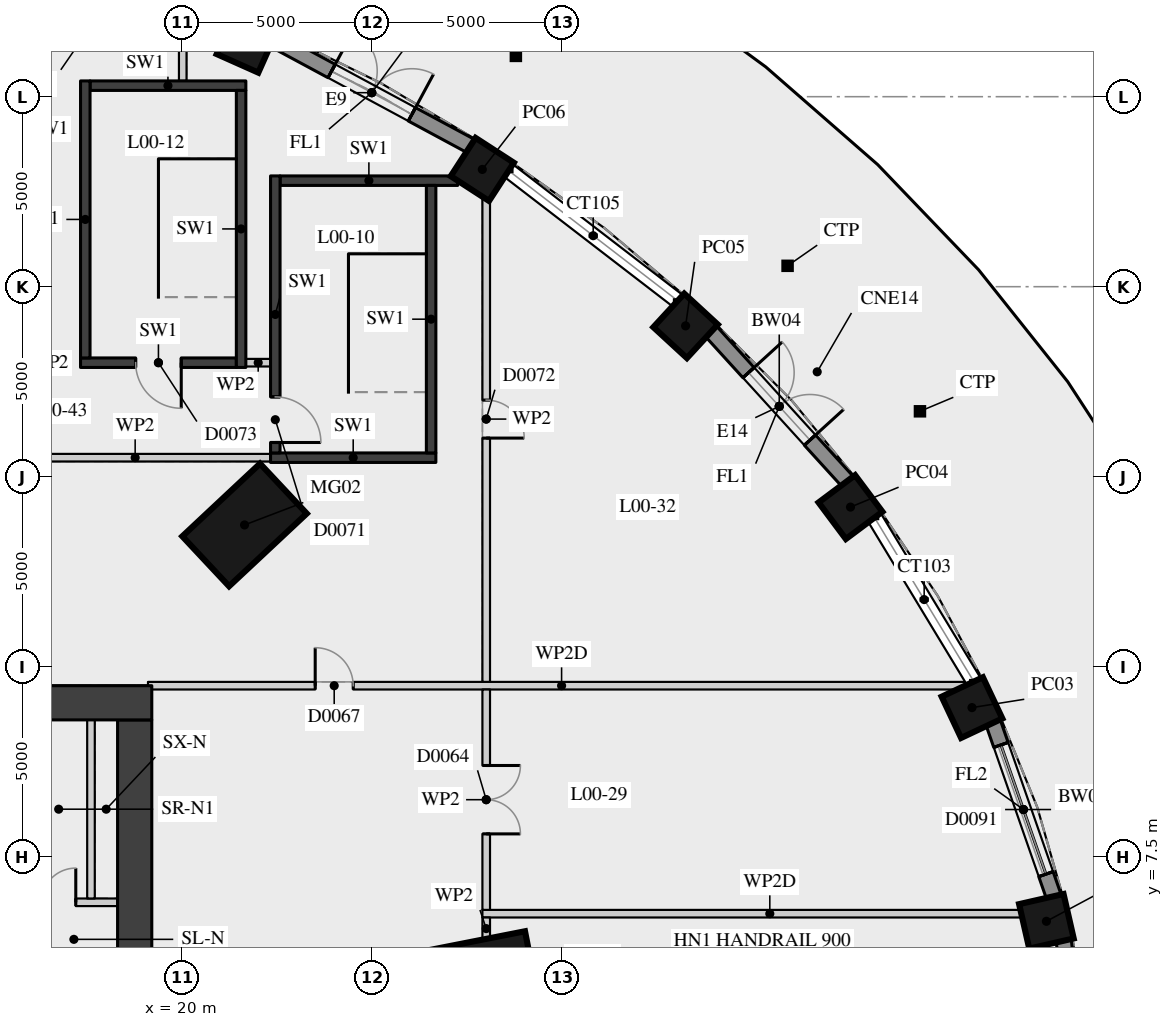
"""IFC4 building model, lengths in metres.
Left out: names, types, materials, properties, quantities, classifications, styles, units other than length and angle.
Written with IfcOpenShell. Run it as: python <this file> out.ifc"""

import sys

from ifc_helpers import new_model, si_unit, direction, frame, frame_2d, origin, origin_2d, place, context, subcontext, project, spatial, rectangle, hollow_circle, extrude, element, fill, save


model = new_model("IFC4")
c1 = context("Model", 3, precision=1e-05, world=origin(), true_north=direction((0.0, 1.0)))
c2 = subcontext(c1, "Body", "Model", "MODEL_VIEW")
j1 = project(units=[si_unit("LENGTHUNIT", "METRE"), si_unit("PLANEANGLEUNIT", "RADIAN")], contexts=[c1])
p1 = place(None, origin())
s1 = spatial("IfcSite", under=j1, at=p1, CompositionType="ELEMENT")
p2 = place(p1, origin())
s2 = spatial("IfcBuilding", under=s1, at=p2, CompositionType="ELEMENT")
p3 = place(p2, origin())
s3 = spatial("IfcBuildingStorey", under=s2, at=p3, CompositionType="ELEMENT", Elevation=0.0)
for number, where, z_axis, x_axis in (
    (1, (27.821, 4.385, 0.0), (0.0, 0.0, 1.0), (0.981, 0.193, 0.0)),
    (2, (21.641, 16.23, 0.0), (0.0, 0.0, 1.0), (0.73, 0.683, 0.0)),
):
    element("IfcColumn", number, at=place(p3, frame(where, z_axis=z_axis, x_axis=x_axis)), inside=s3, PredefinedType="COLUMN", context=c2, shape_type="SweptSolid", body=[
        extrude(rectangle(XDim=2.8, YDim=1.8, at=origin_2d()), origin(), (0.0, 0.0, 1.0), 7.5),
    ])
for number, where, z_axis, x_axis in (
    (3, (42.741, 5.8, 0.0), (0.0, 0.0, 1.0), (0.975, 0.222, 0.0)),
    (4, (40.783, 11.424, 0.0), (0.0, 0.0, 1.0), (0.905, 0.426, 0.0)),
    (5, (37.585, 16.7, 0.0), (0.0, 0.0, 1.0), (0.801, 0.599, 0.0)),
    (6, (33.246, 21.469, 0.0), (0.0, 0.0, 1.0), (0.677, 0.736, 0.0)),
    (7, (27.897, 25.586, 0.0), (0.0, 0.0, 1.0), (0.544, 0.839, 0.0)),
    (8, (21.7, 28.925, 0.0), (0.0, 0.0, 1.0), (0.407, 0.913, 0.0)),
):
    element("IfcColumn", number, at=place(p3, frame(where, z_axis=z_axis, x_axis=x_axis)), inside=s3, PredefinedType="COLUMN", context=c2, shape_type="SweptSolid", body=[
        extrude(rectangle(XDim=1.2, YDim=1.2, at=origin_2d()), origin(), (0.0, 0.0, 1.0), 7.5),
    ])
p4 = place(p3, frame((43.734, 0.57, 0.0), z_axis=(0.0, 0.0, 1.0), x_axis=(-0.112954392721, 0.993600173694, 0.0)))
e9 = element("IfcWall", 9, at=p4, inside=s3, PredefinedType="SOLIDWALL", context=c2, shape_type="SweptSolid", body=[
    extrude(rectangle(XDim=4.779, YDim=0.4, at=frame_2d((2.389, 0.0))), origin(), (0.0, 0.0, 1.0), 6.19),
])
p5 = place(p4, frame((1.189, 0.0, 0.0)))
e10 = element("IfcOpeningElement", 10, at=p5, cuts=e9, PredefinedType="OPENING", context=c2, shape_type="SweptSolid", body=[
    extrude(rectangle(XDim=2.4, YDim=2.2, at=frame_2d((1.2, 1.1))), frame((0.0, 0.21, 0.0), z_axis=(0.0, -1.0, 0.0), x_axis=(1.0, 0.0, 0.0)), (0.0, 0.0, 1.0), 0.42),
])
p6 = place(p4, frame((1.189, 0.0, 2.6)))
e11 = element("IfcOpeningElement", 11, at=p6, cuts=e9, PredefinedType="OPENING", context=c2, shape_type="SweptSolid", body=[
    extrude(rectangle(XDim=2.4, YDim=3.49, at=frame_2d((1.2, 1.745))), frame((0.0, 0.21, 0.0), z_axis=(0.0, -1.0, 0.0), x_axis=(1.0, 0.0, 0.0)), (0.0, 0.0, 1.0), 0.42),
])
p7 = place(p3, frame((42.941, 6.43, 0.0), z_axis=(0.0, 0.0, 1.0), x_axis=(-0.328772164332, 0.944409267193, 0.0)))
e12 = element("IfcWall", 12, at=p7, inside=s3, PredefinedType="SOLIDWALL", context=c2, shape_type="SweptSolid", body=[
    extrude(rectangle(XDim=4.894, YDim=0.4, at=frame_2d((2.447, 0.0))), origin(), (0.0, 0.0, 1.0), 6.19),
])
p8 = place(p7, frame((0.647, 0.0, 0.0)))
e13 = element("IfcOpeningElement", 13, at=p8, cuts=e12, PredefinedType="OPENING", context=c2, shape_type="SweptSolid", body=[
    extrude(rectangle(XDim=3.6, YDim=4.5, at=frame_2d((1.8, 2.25))), frame((0.0, 0.21, 0.0), z_axis=(0.0, -1.0, 0.0), x_axis=(1.0, 0.0, 0.0)), (0.0, 0.0, 1.0), 0.42),
])
p9 = place(p7, frame((0.647, 0.0, 4.9)))
e14 = element("IfcOpeningElement", 14, at=p9, cuts=e12, PredefinedType="OPENING", context=c2, shape_type="SweptSolid", body=[
    extrude(rectangle(XDim=3.6, YDim=1.19, at=frame_2d((1.8, 0.595))), frame((0.0, 0.21, 0.0), z_axis=(0.0, -1.0, 0.0), x_axis=(1.0, 0.0, 0.0)), (0.0, 0.0, 1.0), 0.42),
])
p10 = place(p3, frame((37.52, 17.363, 0.0), z_axis=(0.0, 0.0, 1.0), x_axis=(-0.672941720846, 0.739695505153, 0.0)))
e15 = element("IfcWall", 15, at=p10, inside=s3, PredefinedType="SOLIDWALL", context=c2, shape_type="SweptSolid", body=[
    extrude(rectangle(XDim=5.376, YDim=0.4, at=frame_2d((2.688, 0.0))), origin(), (0.0, 0.0, 1.0), 6.19),
])
p11 = place(p10, frame((1.488, 0.0, 0.0)))
e16 = element("IfcOpeningElement", 16, at=p11, cuts=e15, PredefinedType="OPENING", context=c2, shape_type="SweptSolid", body=[
    extrude(rectangle(XDim=2.4, YDim=2.2, at=frame_2d((1.2, 1.1))), frame((0.0, 0.21, 0.0), z_axis=(0.0, -1.0, 0.0), x_axis=(1.0, 0.0, 0.0)), (0.0, 0.0, 1.0), 0.42),
])
p12 = place(p10, frame((1.488, 0.0, 2.6)))
e17 = element("IfcOpeningElement", 17, at=p12, cuts=e15, PredefinedType="OPENING", context=c2, shape_type="SweptSolid", body=[
    extrude(rectangle(XDim=2.4, YDim=3.49, at=frame_2d((1.2, 1.745))), frame((0.0, 0.21, 0.0), z_axis=(0.0, -1.0, 0.0), x_axis=(1.0, 0.0, 0.0)), (0.0, 0.0, 1.0), 0.42),
])
for number, where, z_axis, x_axis in (
    (18, (39.413, 19.22, -0.2), (0.0, 0.0, 1.0), (1.0, 0.0, 0.0)),
    (19, (35.93, 23.049, -0.2), (0.0, 0.0, 1.0), (1.0, 0.0, 0.0)),
):
    element("IfcColumn", number, at=place(p3, frame(where, z_axis=z_axis, x_axis=x_axis)), inside=s3, PredefinedType="COLUMN", context=c2, shape_type="SweptSolid", body=[
        extrude(hollow_circle(Radius=0.084, WallThickness=0.008, at=origin_2d()), origin(), (0.0, 0.0, 1.0), 4.755),
    ])
p13 = place(p3, frame((27.611, 26.192, 0.0), z_axis=(0.0, 0.0, 1.0), x_axis=(-0.880313157301, 0.474393028072, 0.0)))
e20 = element("IfcWall", 20, at=p13, inside=s3, PredefinedType="SOLIDWALL", context=c2, shape_type="SweptSolid", body=[
    extrude(rectangle(XDim=5.958, YDim=0.4, at=frame_2d((2.979, 0.0))), origin(), (0.0, 0.0, 1.0), 6.19),
])
p14 = place(p13, frame((1.779, 0.0, 0.0)))
e21 = element("IfcOpeningElement", 21, at=p14, cuts=e20, PredefinedType="OPENING", context=c2, shape_type="SweptSolid", body=[
    extrude(rectangle(XDim=2.4, YDim=2.2, at=frame_2d((1.2, 1.1))), frame((0.0, 0.21, 0.0), z_axis=(0.0, -1.0, 0.0), x_axis=(1.0, 0.0, 0.0)), (0.0, 0.0, 1.0), 0.42),
])
p15 = place(p13, frame((1.779, 0.0, 2.6)))
e22 = element("IfcOpeningElement", 22, at=p15, cuts=e20, PredefinedType="OPENING", context=c2, shape_type="SweptSolid", body=[
    extrude(rectangle(XDim=2.4, YDim=3.49, at=frame_2d((1.2, 1.745))), frame((0.0, 0.21, 0.0), z_axis=(0.0, -1.0, 0.0), x_axis=(1.0, 0.0, 0.0)), (0.0, 0.0, 1.0), 0.42),
])
p16 = place(p3, frame((28.781, 28.573, -0.2), z_axis=(0.0, 0.0, 1.0), x_axis=(1.0, 0.0, 0.0)))
e23 = element("IfcColumn", 23, at=p16, inside=s3, PredefinedType="COLUMN", context=c2, shape_type="SweptSolid", body=[
    extrude(hollow_circle(Radius=0.084, WallThickness=0.008, at=origin_2d()), origin(), (0.0, 0.0, 1.0), 4.755),
])
p17 = place(p3, frame((18.75, -11.1, 0.0), z_axis=(0.0, 0.0, 1.0), x_axis=(0.0, 1.0, 0.0)))
e24 = element("IfcWall", 24, at=p17, inside=s3, PredefinedType="SHEAR", context=c2, shape_type="SweptSolid", body=[
    extrude(rectangle(XDim=22.2, YDim=0.9, at=frame_2d((11.1, 0.0))), origin(), (0.0, 0.0, 1.0), 7.09),
])
p18 = place(p17, frame((7.55, 0.0, 0.0)))
e25 = element("IfcOpeningElement", 25, at=p18, cuts=e24, PredefinedType="OPENING", context=c2, shape_type="SweptSolid", body=[
    extrude(rectangle(XDim=1.3, YDim=2.1, at=frame_2d((0.65, 1.05))), frame((0.0, 0.46, 0.0), z_axis=(0.0, -1.0, 0.0), x_axis=(1.0, 0.0, 0.0)), (0.0, 0.0, 1.0), 0.92),
])
p19 = place(p17, frame((10.45, 0.0, 0.0)))
e26 = element("IfcOpeningElement", 26, at=p19, cuts=e24, PredefinedType="OPENING", context=c2, shape_type="SweptSolid", body=[
    extrude(rectangle(XDim=1.3, YDim=2.1, at=frame_2d((0.65, 1.05))), frame((0.0, 0.46, 0.0), z_axis=(0.0, -1.0, 0.0), x_axis=(1.0, 0.0, 0.0)), (0.0, 0.0, 1.0), 0.92),
])
p20 = place(p17, frame((13.35, 0.0, 0.0)))
e27 = element("IfcOpeningElement", 27, at=p20, cuts=e24, PredefinedType="OPENING", context=c2, shape_type="SweptSolid", body=[
    extrude(rectangle(XDim=1.3, YDim=2.1, at=frame_2d((0.65, 1.05))), frame((0.0, 0.46, 0.0), z_axis=(0.0, -1.0, 0.0), x_axis=(1.0, 0.0, 0.0)), (0.0, 0.0, 1.0), 0.92),
])
p21 = place(p3, frame((4.0, 11.55, 0.0), z_axis=(0.0, 0.0, 1.0), x_axis=(1.0, 0.0, 0.0)))
e28 = element("IfcWall", 28, at=p21, inside=s3, PredefinedType="SHEAR", context=c2, shape_type="SweptSolid", body=[
    extrude(rectangle(XDim=15.2, YDim=0.9, at=frame_2d((7.6, 0.0))), origin(), (0.0, 0.0, 1.0), 7.09),
])
p22 = place(p3, frame((16.0, 6.3, 0.0), z_axis=(0.0, 0.0, 1.0), x_axis=(1.0, 0.0, 0.0)))
e29 = element("IfcWall", 29, at=p22, inside=s3, PredefinedType="PARTITIONING", context=c2, shape_type="SweptSolid", body=[
    extrude(rectangle(XDim=2.3, YDim=0.2, at=frame_2d((1.15, 0.0))), origin(), (0.0, 0.0, 1.0), 7.09),
])
p23 = place(p22, frame((0.3, 0.0, 0.0)))
e30 = element("IfcOpeningElement", 30, at=p23, cuts=e29, PredefinedType="OPENING", context=c2, shape_type="SweptSolid", body=[
    extrude(rectangle(XDim=0.9, YDim=2.1, at=frame_2d((0.45, 1.05))), frame((0.0, 0.11, 0.0), z_axis=(0.0, -1.0, 0.0), x_axis=(1.0, 0.0, 0.0)), (0.0, 0.0, 1.0), 0.22),
])
p24 = place(p3, frame((17.6, 6.4, 0.0), z_axis=(0.0, 0.0, 1.0), x_axis=(0.0, 1.0, 0.0)))
e31 = element("IfcWall", 31, at=p24, inside=s3, PredefinedType="PARTITIONING", context=c2, shape_type="SweptSolid", body=[
    extrude(rectangle(XDim=4.7, YDim=0.2, at=frame_2d((2.35, 0.0))), origin(), (0.0, 0.0, 1.0), 7.09),
])
p25 = place(p3, frame((27.9, 6.0, 0.0), z_axis=(0.0, 0.0, 1.0), x_axis=(1.0, 0.0, 0.0)))
e32 = element("IfcWall", 32, at=p25, inside=s3, PredefinedType="PARTITIONING", context=c2, shape_type="SweptSolid", body=[
    extrude(rectangle(XDim=15.125, YDim=0.2, at=frame_2d((7.562, 0.0))), origin(), (0.0, 0.0, 1.0), 6.09),
])
p26 = place(p3, frame((19.1, 12.0, 0.0), z_axis=(0.0, 0.0, 1.0), x_axis=(1.0, 0.0, 0.0)))
e33 = element("IfcWall", 33, at=p26, inside=s3, PredefinedType="PARTITIONING", context=c2, shape_type="SweptSolid", body=[
    extrude(rectangle(XDim=21.767, YDim=0.2, at=frame_2d((10.883, 0.0))), origin(), (0.0, 0.0, 1.0), 6.09),
])
p27 = place(p26, frame((4.4, 0.0, 0.0)))
e34 = element("IfcOpeningElement", 34, at=p27, cuts=e33, PredefinedType="OPENING", context=c2, shape_type="SweptSolid", body=[
    extrude(rectangle(XDim=1.0, YDim=2.1, at=frame_2d((0.5, 1.05))), frame((0.0, 0.11, 0.0), z_axis=(0.0, -1.0, 0.0), x_axis=(1.0, 0.0, 0.0)), (0.0, 0.0, 1.0), 0.22),
])
p28 = place(p3, frame((15.2, 18.0, 0.0), z_axis=(0.0, 0.0, 1.0), x_axis=(1.0, 0.0, 0.0)))
e35 = element("IfcWall", 35, at=p28, inside=s3, PredefinedType="PARTITIONING", context=c2, shape_type="SweptSolid", body=[
    extrude(rectangle(XDim=7.125, YDim=0.2, at=frame_2d((3.562, 0.0))), origin(), (0.0, 0.0, 1.0), 7.09),
])
p29 = place(p3, frame((22.325, 18.0, 0.0), z_axis=(0.0, 0.0, 1.0), x_axis=(1.0, 0.0, 0.0)))
e36 = element("IfcWall", 36, at=p29, inside=s3, PredefinedType="SOLIDWALL", context=c2, shape_type="SweptSolid", body=[
    extrude(rectangle(XDim=4.35, YDim=0.25, at=frame_2d((2.175, 0.0))), origin(), (0.0, 0.0, 1.0), 7.09),
])
p30 = place(p3, frame((17.325, 20.5, 0.0), z_axis=(0.0, 0.0, 1.0), x_axis=(1.0, 0.0, 0.0)))
e37 = element("IfcWall", 37, at=p30, inside=s3, PredefinedType="SOLIDWALL", context=c2, shape_type="SweptSolid", body=[
    extrude(rectangle(XDim=4.1, YDim=0.25, at=frame_2d((2.05, 0.0))), origin(), (0.0, 0.0, 1.0), 7.09),
])
p31 = place(p30, frame((1.45, 0.0, 0.0)))
e38 = element("IfcOpeningElement", 38, at=p31, cuts=e37, PredefinedType="OPENING", context=c2, shape_type="SweptSolid", body=[
    extrude(rectangle(XDim=1.2, YDim=2.1, at=frame_2d((0.6, 1.05))), frame((0.0, 0.135, 0.0), z_axis=(0.0, -1.0, 0.0), x_axis=(1.0, 0.0, 0.0)), (0.0, 0.0, 1.0), 0.27),
])
p32 = place(p3, frame((21.675, 20.5, 0.0), z_axis=(0.0, 0.0, 1.0), x_axis=(1.0, 0.0, 0.0)))
e39 = element("IfcWall", 39, at=p32, inside=s3, PredefinedType="PARTITIONING", context=c2, shape_type="SweptSolid", body=[
    extrude(rectangle(XDim=0.65, YDim=0.2, at=frame_2d((0.325, 0.0))), origin(), (0.0, 0.0, 1.0), 7.09),
])
p33 = place(p3, frame((22.575, 25.29, 0.0), z_axis=(0.0, 0.0, 1.0), x_axis=(1.0, 0.0, 0.0)))
e40 = element("IfcWall", 40, at=p33, inside=s3, PredefinedType="SOLIDWALL", context=c2, shape_type="SweptSolid", body=[
    extrude(rectangle(XDim=4.676, YDim=0.25, at=frame_2d((2.338, 0.0))), origin(), (0.0, 0.0, 1.0), 7.09),
])
p34 = place(p3, frame((17.575, 27.79, 0.0), z_axis=(0.0, 0.0, 1.0), x_axis=(1.0, 0.0, 0.0)))
e41 = element("IfcWall", 41, at=p34, inside=s3, PredefinedType="SOLIDWALL", context=c2, shape_type="SweptSolid", body=[
    extrude(rectangle(XDim=4.1, YDim=0.25, at=frame_2d((2.05, 0.0))), origin(), (0.0, 0.0, 1.0), 7.09),
])
p35 = place(p3, frame((17.45, 20.625, 0.0), z_axis=(0.0, 0.0, 1.0), x_axis=(0.0, 1.0, 0.0)))
e42 = element("IfcWall", 42, at=p35, inside=s3, PredefinedType="SOLIDWALL", context=c2, shape_type="SweptSolid", body=[
    extrude(rectangle(XDim=7.29, YDim=0.25, at=frame_2d((3.645, 0.0))), origin(), (0.0, 0.0, 1.0), 7.09),
])
p36 = place(p3, frame((20.014, 27.915, 0.0), z_axis=(0.0, 0.0, 1.0), x_axis=(0.0, 1.0, 0.0)))
e43 = element("IfcWall", 43, at=p36, inside=s3, PredefinedType="PARTITIONING", context=c2, shape_type="SweptSolid", body=[
    extrude(rectangle(XDim=2.05, YDim=0.2, at=frame_2d((1.025, 0.0))), origin(), (0.0, 0.0, 1.0), 7.09),
])
p37 = place(p3, frame((21.55, 20.375, 0.0), z_axis=(0.0, 0.0, 1.0), x_axis=(0.0, 1.0, 0.0)))
e44 = element("IfcWall", 44, at=p37, inside=s3, PredefinedType="SOLIDWALL", context=c2, shape_type="SweptSolid", body=[
    extrude(rectangle(XDim=7.29, YDim=0.25, at=frame_2d((3.645, 0.0))), origin(), (0.0, 0.0, 1.0), 7.09),
])
p38 = place(p3, frame((22.45, 18.125, 0.0), z_axis=(0.0, 0.0, 1.0), x_axis=(0.0, 1.0, 0.0)))
e45 = element("IfcWall", 45, at=p38, inside=s3, PredefinedType="SOLIDWALL", context=c2, shape_type="SweptSolid", body=[
    extrude(rectangle(XDim=7.29, YDim=0.25, at=frame_2d((3.645, 0.0))), origin(), (0.0, 0.0, 1.0), 7.09),
])
p39 = place(p38, frame((0.275, 0.0, 0.0)))
e46 = element("IfcOpeningElement", 46, at=p39, cuts=e45, PredefinedType="OPENING", context=c2, shape_type="SweptSolid", body=[
    extrude(rectangle(XDim=1.2, YDim=2.1, at=frame_2d((0.6, 1.05))), frame((0.0, 0.135, 0.0), z_axis=(0.0, -1.0, 0.0), x_axis=(1.0, 0.0, 0.0)), (0.0, 0.0, 1.0), 0.27),
])
p40 = place(p3, frame((26.55, 18.125, 0.0), z_axis=(0.0, 0.0, 1.0), x_axis=(0.0, 1.0, 0.0)))
e47 = element("IfcWall", 47, at=p40, inside=s3, PredefinedType="SOLIDWALL", context=c2, shape_type="SweptSolid", body=[
    extrude(rectangle(XDim=7.04, YDim=0.25, at=frame_2d((3.52, 0.0))), origin(), (0.0, 0.0, 1.0), 7.09),
])
p41 = place(p3, frame((28.0, 5.315, 0.0), z_axis=(0.0, 0.0, 1.0), x_axis=(0.0, 1.0, 0.0)))
e48 = element("IfcWall", 48, at=p41, inside=s3, PredefinedType="PARTITIONING", context=c2, shape_type="SweptSolid", body=[
    extrude(rectangle(XDim=0.584, YDim=0.2, at=frame_2d((0.292, 0.0))), origin(), (0.0, 0.0, 1.0), 7.09),
])
p42 = place(p3, frame((28.0, 6.1, 0.0), z_axis=(0.0, 0.0, 1.0), x_axis=(0.0, 1.0, 0.0)))
e49 = element("IfcWall", 49, at=p42, inside=s3, PredefinedType="PARTITIONING", context=c2, shape_type="SweptSolid", body=[
    extrude(rectangle(XDim=5.8, YDim=0.2, at=frame_2d((2.9, 0.0))), origin(), (0.0, 0.0, 1.0), 7.09),
])
p43 = place(p42, frame((2.0, 0.0, 0.0)))
e50 = element("IfcOpeningElement", 50, at=p43, cuts=e49, PredefinedType="OPENING", context=c2, shape_type="SweptSolid", body=[
    extrude(rectangle(XDim=1.8, YDim=2.1, at=frame_2d((0.9, 1.05))), frame((0.0, 0.11, 0.0), z_axis=(0.0, -1.0, 0.0), x_axis=(1.0, 0.0, 0.0)), (0.0, 0.0, 1.0), 0.22),
])
p44 = place(p3, frame((28.0, 12.1, 0.0), z_axis=(0.0, 0.0, 1.0), x_axis=(0.0, 1.0, 0.0)))
e51 = element("IfcWall", 51, at=p44, inside=s3, PredefinedType="PARTITIONING", context=c2, shape_type="SweptSolid", body=[
    extrude(rectangle(XDim=13.832, YDim=0.2, at=frame_2d((6.916, 0.0))), origin(), (0.0, 0.0, 1.0), 7.09),
])
p45 = place(p44, frame((6.416, 0.0, 0.0)))
e52 = element("IfcOpeningElement", 52, at=p45, cuts=e51, PredefinedType="OPENING", context=c2, shape_type="SweptSolid", body=[
    extrude(rectangle(XDim=1.0, YDim=2.1, at=frame_2d((0.5, 1.05))), frame((0.0, 0.11, 0.0), z_axis=(0.0, -1.0, 0.0), x_axis=(1.0, 0.0, 0.0)), (0.0, 0.0, 1.0), 0.22),
])
p46 = place(p8, frame((3.6, 0.0, 0.0), z_axis=(0.0, 0.0, 1.0), x_axis=(-1.0, 0.0, 0.0)))
e53 = element("IfcDoor", 53, at=p46, inside=s3, OperationType="ROLLINGUP", PredefinedType="DOOR", context=c2, shape_type="SweptSolid", body=[
    extrude(rectangle(XDim=3.6, YDim=4.5, at=frame_2d((1.8, 2.25))), frame((0.0, 0.05, 0.0), z_axis=(0.0, -1.0, 0.0), x_axis=(1.0, 0.0, 0.0)), (0.0, 0.0, 1.0), 0.05),
])
fill(e13, e53)
p47 = place(p9, origin())
e54 = element("IfcWindow", 54, at=p47, inside=s3, PartitioningType="SINGLE_PANEL", PredefinedType="WINDOW", context=c2, shape_type="SweptSolid", body=[
    extrude(rectangle(XDim=3.6, YDim=1.19, at=frame_2d((1.8, 0.595))), frame((0.0, 0.01, 0.0), z_axis=(0.0, -1.0, 0.0), x_axis=(1.0, 0.0, 0.0)), (0.0, 0.0, 1.0), 0.06),
])
fill(e14, e54)
p48 = place(p11, frame((2.4, 0.0, 0.0), z_axis=(0.0, 0.0, 1.0), x_axis=(-1.0, 0.0, 0.0)))
e55 = element("IfcDoor", 55, at=p48, inside=s3, OperationType="DOUBLE_DOOR_SINGLE_SWING", PredefinedType="DOOR", context=c2, shape_type="SweptSolid", body=[
    extrude(rectangle(XDim=2.4, YDim=2.2, at=frame_2d((1.2, 1.1))), frame((0.0, 0.05, 0.0), z_axis=(0.0, -1.0, 0.0), x_axis=(1.0, 0.0, 0.0)), (0.0, 0.0, 1.0), 0.05),
])
fill(e16, e55)
p49 = place(p12, origin())
e56 = element("IfcWindow", 56, at=p49, inside=s3, PartitioningType="SINGLE_PANEL", PredefinedType="WINDOW", context=c2, shape_type="SweptSolid", body=[
    extrude(rectangle(XDim=2.4, YDim=3.49, at=frame_2d((1.2, 1.745))), frame((0.0, 0.01, 0.0), z_axis=(0.0, -1.0, 0.0), x_axis=(1.0, 0.0, 0.0)), (0.0, 0.0, 1.0), 0.06),
])
fill(e17, e56)
p50 = place(p14, frame((2.4, 0.0, 0.0), z_axis=(0.0, 0.0, 1.0), x_axis=(-1.0, 0.0, 0.0)))
e57 = element("IfcDoor", 57, at=p50, inside=s3, OperationType="DOUBLE_DOOR_SINGLE_SWING", PredefinedType="DOOR", context=c2, shape_type="SweptSolid", body=[
    extrude(rectangle(XDim=2.4, YDim=2.2, at=frame_2d((1.2, 1.1))), frame((0.0, 0.05, 0.0), z_axis=(0.0, -1.0, 0.0), x_axis=(1.0, 0.0, 0.0)), (0.0, 0.0, 1.0), 0.05),
])
fill(e21, e57)
p51 = place(p15, origin())
e58 = element("IfcWindow", 58, at=p51, inside=s3, PartitioningType="SINGLE_PANEL", PredefinedType="WINDOW", context=c2, shape_type="SweptSolid", body=[
    extrude(rectangle(XDim=2.4, YDim=3.49, at=frame_2d((1.2, 1.745))), frame((0.0, 0.01, 0.0), z_axis=(0.0, -1.0, 0.0), x_axis=(1.0, 0.0, 0.0)), (0.0, 0.0, 1.0), 0.06),
])
fill(e22, e58)
p52 = place(p23, origin())
e59 = element("IfcDoor", 59, at=p52, inside=s3, OperationType="SINGLE_SWING_RIGHT", PredefinedType="DOOR", context=c2, shape_type="SweptSolid", body=[
    extrude(rectangle(XDim=0.9, YDim=2.1, at=frame_2d((0.45, 1.05))), frame((0.0, 0.025, 0.0), z_axis=(0.0, -1.0, 0.0), x_axis=(1.0, 0.0, 0.0)), (0.0, 0.0, 1.0), 0.05),
])
fill(e30, e59)
p53 = place(p31, origin())
e60 = element("IfcDoor", 60, at=p53, inside=s3, OperationType="SINGLE_SWING_LEFT", PredefinedType="DOOR", context=c2, shape_type="SweptSolid", body=[
    extrude(rectangle(XDim=1.2, YDim=2.1, at=frame_2d((0.6, 1.05))), frame((0.0, 0.025, 0.0), z_axis=(0.0, -1.0, 0.0), x_axis=(1.0, 0.0, 0.0)), (0.0, 0.0, 1.0), 0.05),
])
fill(e38, e60)
p54 = place(p39, origin())
e61 = element("IfcDoor", 61, at=p54, inside=s3, OperationType="SINGLE_SWING_RIGHT", PredefinedType="DOOR", context=c2, shape_type="SweptSolid", body=[
    extrude(rectangle(XDim=1.2, YDim=2.1, at=frame_2d((0.6, 1.05))), frame((0.0, 0.025, 0.0), z_axis=(0.0, -1.0, 0.0), x_axis=(1.0, 0.0, 0.0)), (0.0, 0.0, 1.0), 0.05),
])
fill(e46, e61)
p55 = place(p27, origin())
e62 = element("IfcDoor", 62, at=p55, inside=s3, OperationType="SINGLE_SWING_LEFT", PredefinedType="DOOR", context=c2, shape_type="SweptSolid", body=[
    extrude(rectangle(XDim=1.0, YDim=2.1, at=frame_2d((0.5, 1.05))), frame((0.0, 0.025, 0.0), z_axis=(0.0, -1.0, 0.0), x_axis=(1.0, 0.0, 0.0)), (0.0, 0.0, 1.0), 0.05),
])
fill(e34, e62)
p56 = place(p43, origin())
e63 = element("IfcDoor", 63, at=p56, inside=s3, OperationType="DOUBLE_DOOR_SINGLE_SWING", PredefinedType="DOOR", context=c2, shape_type="SweptSolid", body=[
    extrude(rectangle(XDim=1.8, YDim=2.1, at=frame_2d((0.9, 1.05))), frame((0.0, 0.025, 0.0), z_axis=(0.0, -1.0, 0.0), x_axis=(1.0, 0.0, 0.0)), (0.0, 0.0, 1.0), 0.05),
])
fill(e50, e63)
p57 = place(p45, origin())
e64 = element("IfcDoor", 64, at=p57, inside=s3, OperationType="SINGLE_SWING_RIGHT", PredefinedType="DOOR", context=c2, shape_type="SweptSolid", body=[
    extrude(rectangle(XDim=1.0, YDim=2.1, at=frame_2d((0.5, 1.05))), frame((0.0, 0.025, 0.0), z_axis=(0.0, -1.0, 0.0), x_axis=(1.0, 0.0, 0.0)), (0.0, 0.0, 1.0), 0.05),
])
fill(e52, e64)
save(model, sys.argv[1])
